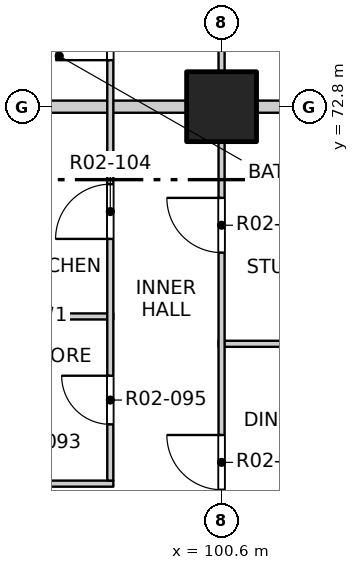
"""IFC4 building model, lengths in metres.
Left out: names, types, materials, properties, quantities, classifications, styles, units other than length and angle.
Written with IfcOpenShell. Run it as: python <this file> out.ifc"""

import sys

from ifc_helpers import new_model, si_unit, direction, frame, frame_2d, origin, origin_2d, place, context, subcontext, project, spatial, rectangle, extrude, element, fill, save


model = new_model("IFC4")
c1 = context("Model", 3, precision=1e-05, world=origin(), true_north=direction((0.0, 1.0)))
c2 = subcontext(c1, "Body", "Model", "MODEL_VIEW")
j1 = project(units=[si_unit("LENGTHUNIT", "METRE"), si_unit("PLANEANGLEUNIT", "RADIAN")], contexts=[c1])
p1 = place(None, origin())
s1 = spatial("IfcSite", under=j1, at=p1, CompositionType="ELEMENT")
p2 = place(p1, origin())
s2 = spatial("IfcBuilding", under=s1, at=p2, CompositionType="ELEMENT")
p3 = place(p2, frame((0.0, 0.0, 29.7)))
s3 = spatial("IfcBuildingStorey", under=s2, at=p3, CompositionType="ELEMENT", Elevation=29.7)
p4 = place(p3, frame((100.6, 72.8, -0.25), z_axis=(0.0, 0.0, 1.0), x_axis=(1.0, 0.0, 0.0)))
e1 = element("IfcColumn", 1, at=p4, inside=s3, PredefinedType="COLUMN", context=c2, shape_type="SweptSolid", body=[
    extrude(rectangle(XDim=1.15, YDim=1.15, at=origin_2d()), origin(), (0.0, 0.0, 1.0), 3.4),
])
p5 = place(p3, frame((96.6, 66.6, 0.0), z_axis=(0.0, 0.0, 1.0), x_axis=(1.0, 0.0, 0.0)))
e2 = element("IfcWall", 2, at=p5, inside=s3, PredefinedType="PARTITIONING", context=c2, shape_type="SweptSolid", body=[
    extrude(rectangle(XDim=2.22, YDim=0.1, at=frame_2d((1.11, 0.0))), origin(), (0.0, 0.0, 1.0), 3.15),
])
p6 = place(p3, frame((100.55, 68.9, 0.0), z_axis=(0.0, 0.0, 1.0), x_axis=(1.0, 0.0, 0.0)))
e3 = element("IfcWall", 3, at=p6, inside=s3, PredefinedType="PARTITIONING", context=c2, shape_type="SweptSolid", body=[
    extrude(rectangle(XDim=7.55, YDim=0.1, at=frame_2d((3.775, 0.0))), origin(), (0.0, 0.0, 1.0), 3.15),
])
p7 = place(p3, frame((96.6, 69.35, 0.0), z_axis=(0.0, 0.0, 1.0), x_axis=(1.0, 0.0, 0.0)))
e4 = element("IfcWall", 4, at=p7, inside=s3, PredefinedType="PARTITIONING", context=c2, shape_type="SweptSolid", body=[
    extrude(rectangle(XDim=2.22, YDim=0.1, at=frame_2d((1.11, 0.0))), origin(), (0.0, 0.0, 1.0), 3.15),
])
p8 = place(p3, frame((96.6, 72.8, 0.0), z_axis=(0.0, 0.0, 1.0), x_axis=(1.0, 0.0, 0.0)))
e5 = element("IfcWall", 5, at=p8, inside=s3, PredefinedType="PARTITIONING", context=c2, shape_type="SweptSolid", body=[
    extrude(rectangle(XDim=4.0, YDim=0.2, at=frame_2d((2.0, 0.0))), origin(), (0.0, 0.0, 1.0), 3.15),
])
p9 = place(p3, frame((100.6, 72.8, 0.0), z_axis=(0.0, 0.0, 1.0), x_axis=(1.0, 0.0, 0.0)))
e6 = element("IfcWall", 6, at=p9, inside=s3, PredefinedType="PARTITIONING", context=c2, shape_type="SweptSolid", body=[
    extrude(rectangle(XDim=7.5, YDim=0.2, at=frame_2d((3.75, 0.0))), origin(), (0.0, 0.0, 1.0), 2.55),
])
p10 = place(p3, frame((98.77, 66.65, 0.0), z_axis=(0.0, 0.0, 1.0), x_axis=(0.0, 1.0, 0.0)))
e7 = element("IfcWall", 7, at=p10, inside=s3, PredefinedType="PARTITIONING", context=c2, shape_type="SweptSolid", body=[
    extrude(rectangle(XDim=14.95, YDim=0.1, at=frame_2d((7.475, 0.0))), origin(), (0.0, 0.0, 1.0), 3.15),
])
p11 = place(p10, frame((0.925, 0.0, 0.0)))
e8 = element("IfcOpeningElement", 8, at=p11, cuts=e7, PredefinedType="OPENING", context=c2, shape_type="SweptSolid", body=[
    extrude(rectangle(XDim=0.8, YDim=2.1, at=frame_2d((0.4, 1.05))), frame((0.0, 0.06, 0.0), z_axis=(0.0, -1.0, 0.0), x_axis=(1.0, 0.0, 0.0)), (0.0, 0.0, 1.0), 0.12),
])
p12 = place(p10, frame((3.975, 0.0, 0.0)))
e9 = element("IfcOpeningElement", 9, at=p12, cuts=e7, PredefinedType="OPENING", context=c2, shape_type="SweptSolid", body=[
    extrude(rectangle(XDim=0.9, YDim=2.1, at=frame_2d((0.45, 1.05))), frame((0.0, 0.06, 0.0), z_axis=(0.0, -1.0, 0.0), x_axis=(1.0, 0.0, 0.0)), (0.0, 0.0, 1.0), 0.12),
])
p13 = place(p10, frame((6.915, 0.0, 0.0)))
e10 = element("IfcOpeningElement", 10, at=p13, cuts=e7, PredefinedType="OPENING", context=c2, shape_type="SweptSolid", body=[
    extrude(rectangle(XDim=0.9, YDim=2.1, at=frame_2d((0.45, 1.05))), frame((0.0, 0.06, 0.0), z_axis=(0.0, -1.0, 0.0), x_axis=(1.0, 0.0, 0.0)), (0.0, 0.0, 1.0), 0.12),
])
p14 = place(p10, frame((9.63, 0.0, 0.0)))
e11 = element("IfcOpeningElement", 11, at=p14, cuts=e7, PredefinedType="OPENING", context=c2, shape_type="SweptSolid", body=[
    extrude(rectangle(XDim=0.8, YDim=2.1, at=frame_2d((0.4, 1.05))), frame((0.0, 0.06, 0.0), z_axis=(0.0, -1.0, 0.0), x_axis=(1.0, 0.0, 0.0)), (0.0, 0.0, 1.0), 0.12),
])
p15 = place(p10, frame((12.79, 0.0, 0.0)))
e12 = element("IfcOpeningElement", 12, at=p15, cuts=e7, PredefinedType="OPENING", context=c2, shape_type="SweptSolid", body=[
    extrude(rectangle(XDim=0.9, YDim=2.1, at=frame_2d((0.45, 1.05))), frame((0.0, 0.06, 0.0), z_axis=(0.0, -1.0, 0.0), x_axis=(1.0, 0.0, 0.0)), (0.0, 0.0, 1.0), 0.12),
])
p16 = place(p3, frame((100.6, 49.4, 0.0), z_axis=(0.0, 0.0, 1.0), x_axis=(0.0, 1.0, 0.0)))
e13 = element("IfcWall", 13, at=p16, inside=s3, PredefinedType="PARTITIONING", context=c2, shape_type="SweptSolid", body=[
    extrude(rectangle(XDim=31.2, YDim=0.1, at=frame_2d((15.6, 0.0))), origin(), (0.0, 0.0, 1.0), 3.15),
])
p17 = place(p16, frame((2.475, 0.0, 0.0)))
e14 = element("IfcOpeningElement", 14, at=p17, cuts=e13, PredefinedType="OPENING", context=c2, shape_type="SweptSolid", body=[
    extrude(rectangle(XDim=0.9, YDim=2.1, at=frame_2d((0.45, 1.05))), frame((0.0, 0.06, 0.0), z_axis=(0.0, -1.0, 0.0), x_axis=(1.0, 0.0, 0.0)), (0.0, 0.0, 1.0), 0.12),
])
p18 = place(p16, frame((5.4, 0.0, 0.0)))
e15 = element("IfcOpeningElement", 15, at=p18, cuts=e13, PredefinedType="OPENING", context=c2, shape_type="SweptSolid", body=[
    extrude(rectangle(XDim=0.9, YDim=2.1, at=frame_2d((0.45, 1.05))), frame((0.0, 0.06, 0.0), z_axis=(0.0, -1.0, 0.0), x_axis=(1.0, 0.0, 0.0)), (0.0, 0.0, 1.0), 0.12),
])
p19 = place(p16, frame((10.275, 0.0, 0.0)))
e16 = element("IfcOpeningElement", 16, at=p19, cuts=e13, PredefinedType="OPENING", context=c2, shape_type="SweptSolid", body=[
    extrude(rectangle(XDim=0.9, YDim=2.1, at=frame_2d((0.45, 1.05))), frame((0.0, 0.06, 0.0), z_axis=(0.0, -1.0, 0.0), x_axis=(1.0, 0.0, 0.0)), (0.0, 0.0, 1.0), 0.12),
])
p20 = place(p16, frame((14.0, 0.0, 0.0)))
e17 = element("IfcOpeningElement", 17, at=p20, cuts=e13, PredefinedType="OPENING", context=c2, shape_type="SweptSolid", body=[
    extrude(rectangle(XDim=0.9, YDim=2.1, at=frame_2d((0.45, 1.05))), frame((0.0, 0.06, 0.0), z_axis=(0.0, -1.0, 0.0), x_axis=(1.0, 0.0, 0.0)), (0.0, 0.0, 1.0), 0.12),
])
p21 = place(p16, frame((17.1, 0.0, 0.0)))
e18 = element("IfcOpeningElement", 18, at=p21, cuts=e13, PredefinedType="OPENING", context=c2, shape_type="SweptSolid", body=[
    extrude(rectangle(XDim=0.9, YDim=2.1, at=frame_2d((0.45, 1.05))), frame((0.0, 0.06, 0.0), z_axis=(0.0, -1.0, 0.0), x_axis=(1.0, 0.0, 0.0)), (0.0, 0.0, 1.0), 0.12),
])
p22 = place(p16, frame((21.0, 0.0, 0.0)))
e19 = element("IfcOpeningElement", 19, at=p22, cuts=e13, PredefinedType="OPENING", context=c2, shape_type="SweptSolid", body=[
    extrude(rectangle(XDim=0.9, YDim=2.1, at=frame_2d((0.45, 1.05))), frame((0.0, 0.06, 0.0), z_axis=(0.0, -1.0, 0.0), x_axis=(1.0, 0.0, 0.0)), (0.0, 0.0, 1.0), 0.12),
])
p23 = place(p16, frame((25.875, 0.0, 0.0)))
e20 = element("IfcOpeningElement", 20, at=p23, cuts=e13, PredefinedType="OPENING", context=c2, shape_type="SweptSolid", body=[
    extrude(rectangle(XDim=0.9, YDim=2.1, at=frame_2d((0.45, 1.05))), frame((0.0, 0.06, 0.0), z_axis=(0.0, -1.0, 0.0), x_axis=(1.0, 0.0, 0.0)), (0.0, 0.0, 1.0), 0.12),
])
p24 = place(p16, frame((29.6, 0.0, 0.0)))
e21 = element("IfcOpeningElement", 21, at=p24, cuts=e13, PredefinedType="OPENING", context=c2, shape_type="SweptSolid", body=[
    extrude(rectangle(XDim=0.9, YDim=2.1, at=frame_2d((0.45, 1.05))), frame((0.0, 0.06, 0.0), z_axis=(0.0, -1.0, 0.0), x_axis=(1.0, 0.0, 0.0)), (0.0, 0.0, 1.0), 0.12),
])
p25 = place(p21, origin())
e22 = element("IfcDoor", 22, at=p25, inside=s3, OperationType="SINGLE_SWING_RIGHT", PredefinedType="DOOR", context=c2, shape_type="SweptSolid", body=[
    extrude(rectangle(XDim=0.9, YDim=2.1, at=frame_2d((0.45, 1.05))), frame((0.0, 0.025, 0.0), z_axis=(0.0, -1.0, 0.0), x_axis=(1.0, 0.0, 0.0)), (0.0, 0.0, 1.0), 0.05),
])
fill(e18, e22)
p26 = place(p11, origin())
e23 = element("IfcDoor", 23, at=p26, inside=s3, OperationType="SINGLE_SWING_RIGHT", PredefinedType="DOOR", context=c2, shape_type="SweptSolid", body=[
    extrude(rectangle(XDim=0.8, YDim=2.1, at=frame_2d((0.4, 1.05))), frame((0.0, 0.025, 0.0), z_axis=(0.0, -1.0, 0.0), x_axis=(1.0, 0.0, 0.0)), (0.0, 0.0, 1.0), 0.05),
])
fill(e8, e23)
p27 = place(p22, origin())
e24 = element("IfcDoor", 24, at=p27, inside=s3, OperationType="SINGLE_SWING_RIGHT", PredefinedType="DOOR", context=c2, shape_type="SweptSolid", body=[
    extrude(rectangle(XDim=0.9, YDim=2.1, at=frame_2d((0.45, 1.05))), frame((0.0, 0.025, 0.0), z_axis=(0.0, -1.0, 0.0), x_axis=(1.0, 0.0, 0.0)), (0.0, 0.0, 1.0), 0.05),
])
fill(e19, e24)
p28 = place(p12, origin())
e25 = element("IfcDoor", 25, at=p28, inside=s3, OperationType="SINGLE_SWING_LEFT", PredefinedType="DOOR", context=c2, shape_type="SweptSolid", body=[
    extrude(rectangle(XDim=0.9, YDim=2.1, at=frame_2d((0.45, 1.05))), frame((0.0, 0.025, 0.0), z_axis=(0.0, -1.0, 0.0), x_axis=(1.0, 0.0, 0.0)), (0.0, 0.0, 1.0), 0.05),
])
fill(e9, e25)
p29 = place(p13, origin())
e26 = element("IfcDoor", 26, at=p29, inside=s3, OperationType="SINGLE_SWING_LEFT", PredefinedType="DOOR", context=c2, shape_type="SweptSolid", body=[
    extrude(rectangle(XDim=0.9, YDim=2.1, at=frame_2d((0.45, 1.05))), frame((0.0, 0.025, 0.0), z_axis=(0.0, -1.0, 0.0), x_axis=(1.0, 0.0, 0.0)), (0.0, 0.0, 1.0), 0.05),
])
fill(e10, e26)
save(model, sys.argv[1])
